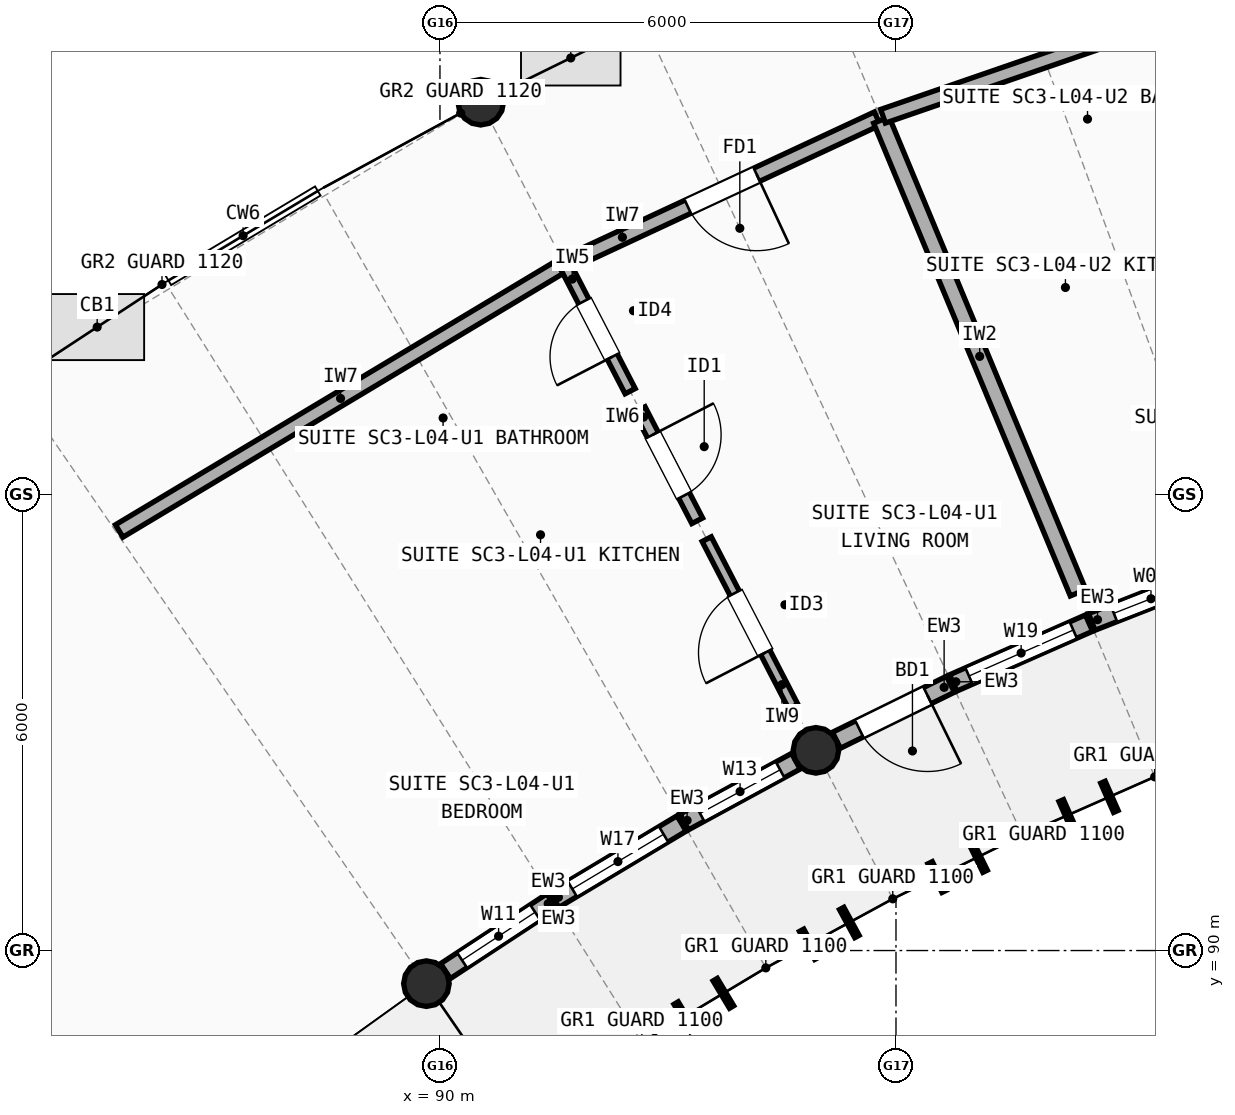
"""IFC4 building model, lengths in metres.
Left out: names, types, materials, properties, quantities, classifications, styles, units other than length and angle.
Written with IfcOpenShell. Run it as: python <this file> out.ifc"""

import sys

from ifc_helpers import new_model, si_unit, direction, frame, frame_2d, origin, origin_2d, place, context, subcontext, project, spatial, rectangle, circle, extrude, element, fill, save


model = new_model("IFC4")
c1 = context("Model", 3, precision=1e-05, world=origin(), true_north=direction((0.0, 1.0)))
c2 = subcontext(c1, "Body", "Model", "MODEL_VIEW")
j1 = project(units=[si_unit("LENGTHUNIT", "METRE"), si_unit("PLANEANGLEUNIT", "RADIAN")], contexts=[c1])
p1 = place(None, origin())
s1 = spatial("IfcSite", under=j1, at=p1, CompositionType="ELEMENT")
p2 = place(p1, origin())
s2 = spatial("IfcBuilding", under=s1, at=p2, CompositionType="ELEMENT")
p3 = place(p2, frame((0.0, 0.0, 14.1)))
s3 = spatial("IfcBuildingStorey", under=s2, at=p3, CompositionType="ELEMENT", Elevation=14.1)
for number, where, z_axis, x_axis in (
    (1, (89.822, 89.564, 0.0), (0.0, 0.0, 1.0), (1.0, 0.0, 0.0)),
    (2, (94.947, 92.634, 0.0), (0.0, 0.0, 1.0), (1.0, 0.0, 0.0)),
    (3, (90.536, 101.161, 0.0), (0.0, 0.0, 1.0), (1.0, 0.0, 0.0)),
):
    element("IfcColumn", number, at=place(p3, frame(where, z_axis=z_axis, x_axis=x_axis)), inside=s3, PredefinedType="COLUMN", context=c2, shape_type="SweptSolid", body=[
        extrude(circle(Radius=0.3, at=origin_2d()), origin(), (0.0, 0.0, 1.0), 2.948),
    ])
p4 = place(p3, frame((90.073, 89.729, 0.0), z_axis=(0.0, 0.0, 1.0), x_axis=(0.83589302699, 0.548892382375, 0.0)))
e4 = element("IfcWall", 4, at=p4, inside=s3, PredefinedType="STANDARD", context=c2, shape_type="SweptSolid", body=[
    extrude(rectangle(XDim=1.672, YDim=0.235, at=frame_2d((0.836, 0.0))), origin(), (0.0, 0.0, 1.0), 2.684),
])
p5 = place(p4, frame((0.261, 0.0, 0.85)))
e5 = element("IfcOpeningElement", 5, at=p5, cuts=e4, PredefinedType="OPENING", context=c2, shape_type="SweptSolid", body=[
    extrude(rectangle(XDim=1.15, YDim=1.45, at=frame_2d((0.575, 0.725))), frame((0.0, 0.127, 0.0), z_axis=(0.0, -1.0, 0.0), x_axis=(1.0, 0.0, 0.0)), (0.0, 0.0, 1.0), 0.255),
])
p6 = place(p3, frame((91.504, 90.668, 0.0), z_axis=(0.0, 0.0, 1.0), x_axis=(0.85787888411, 0.51385194385, 0.0)))
e6 = element("IfcWall", 6, at=p6, inside=s3, PredefinedType="STANDARD", context=c2, shape_type="SweptSolid", body=[
    extrude(rectangle(XDim=1.952, YDim=0.235, at=frame_2d((0.976, 0.0))), origin(), (0.0, 0.0, 1.0), 2.684),
])
p7 = place(p6, frame((0.276, 0.0, 0.85)))
e7 = element("IfcOpeningElement", 7, at=p7, cuts=e6, PredefinedType="OPENING", context=c2, shape_type="SweptSolid", body=[
    extrude(rectangle(XDim=1.4, YDim=1.5, at=frame_2d((0.7, 0.75))), frame((0.0, 0.127, 0.0), z_axis=(0.0, -1.0, 0.0), x_axis=(1.0, 0.0, 0.0)), (0.0, 0.0, 1.0), 0.255),
])
p8 = place(p3, frame((93.214, 91.692, 0.0), z_axis=(0.0, 0.0, 1.0), x_axis=(0.878508628322, 0.477726480284, 0.0)))
e8 = element("IfcWall", 8, at=p8, inside=s3, PredefinedType="STANDARD", context=c2, shape_type="SweptSolid", body=[
    extrude(rectangle(XDim=1.672, YDim=0.235, at=frame_2d((0.836, 0.0))), origin(), (0.0, 0.0, 1.0), 2.684),
])
p9 = place(p8, frame((0.236, 0.0, 0.85)))
e9 = element("IfcOpeningElement", 9, at=p9, cuts=e8, PredefinedType="OPENING", context=c2, shape_type="SweptSolid", body=[
    extrude(rectangle(XDim=1.2, YDim=1.45, at=frame_2d((0.6, 0.725))), frame((0.0, 0.127, 0.0), z_axis=(0.0, -1.0, 0.0), x_axis=(1.0, 0.0, 0.0)), (0.0, 0.0, 1.0), 0.255),
])
p10 = place(p3, frame((95.216, 92.766, 0.0), z_axis=(0.0, 0.0, 1.0), x_axis=(0.897558380725, 0.440895626186, 0.0)))
e10 = element("IfcWall", 10, at=p10, inside=s3, PredefinedType="STANDARD", context=c2, shape_type="SweptSolid", body=[
    extrude(rectangle(XDim=1.672, YDim=0.235, at=frame_2d((0.836, 0.0))), origin(), (0.0, 0.0, 1.0), 2.684),
])
p11 = place(p10, frame((0.336, 0.0, 0.0)))
e11 = element("IfcOpeningElement", 11, at=p11, cuts=e10, PredefinedType="OPENING", context=c2, shape_type="SweptSolid", body=[
    extrude(rectangle(XDim=1.0, YDim=2.15, at=frame_2d((0.5, 1.075))), frame((0.0, 0.127, 0.0), z_axis=(0.0, -1.0, 0.0), x_axis=(1.0, 0.0, 0.0)), (0.0, 0.0, 1.0), 0.255),
])
p12 = place(p3, frame((96.753, 93.521, 0.0), z_axis=(0.0, 0.0, 1.0), x_axis=(0.915126852478, 0.403166025197, 0.0)))
e12 = element("IfcWall", 12, at=p12, inside=s3, PredefinedType="STANDARD", context=c2, shape_type="SweptSolid", body=[
    extrude(rectangle(XDim=1.952, YDim=0.235, at=frame_2d((0.976, 0.0))), origin(), (0.0, 0.0, 1.0), 2.684),
])
p13 = place(p12, frame((0.226, 0.0, 0.85)))
e13 = element("IfcOpeningElement", 13, at=p13, cuts=e12, PredefinedType="OPENING", context=c2, shape_type="SweptSolid", body=[
    extrude(rectangle(XDim=1.5, YDim=1.5, at=frame_2d((0.75, 0.75))), frame((0.0, 0.127, 0.0), z_axis=(0.0, -1.0, 0.0), x_axis=(1.0, 0.0, 0.0)), (0.0, 0.0, 1.0), 0.255),
])
p14 = place(p3, frame((98.577, 94.323, 0.0), z_axis=(0.0, 0.0, 1.0), x_axis=(0.930962495902, 0.365114819233, 0.0)))
e14 = element("IfcWall", 14, at=p14, inside=s3, PredefinedType="STANDARD", context=c2, shape_type="SweptSolid", body=[
    extrude(rectangle(XDim=1.672, YDim=0.235, at=frame_2d((0.836, 0.0))), origin(), (0.0, 0.0, 1.0), 2.684),
])
p15 = place(p14, frame((0.311, 0.0, 0.85)))
e15 = element("IfcOpeningElement", 15, at=p15, cuts=e14, PredefinedType="OPENING", context=c2, shape_type="SweptSolid", body=[
    extrude(rectangle(XDim=1.05, YDim=1.35, at=frame_2d((0.525, 0.675))), frame((0.0, 0.127, 0.0), z_axis=(0.0, -1.0, 0.0), x_axis=(1.0, 0.0, 0.0)), (0.0, 0.0, 1.0), 0.255),
])
p16 = place(p3, frame((85.779, 95.52, 0.0), z_axis=(0.0, 0.0, 1.0), x_axis=(0.857911441451, 0.513797585268, 0.0)))
e16 = element("IfcWall", 16, at=p16, inside=s3, PredefinedType="SOLIDWALL", context=c2, shape_type="SweptSolid", body=[
    extrude(rectangle(XDim=6.79, YDim=0.19, at=frame_2d((3.395, 0.0))), origin(), (0.0, 0.0, 1.0), 2.742),
])
p17 = place(p3, frame((91.675, 99.046, 0.0), z_axis=(0.0, 0.0, 1.0), x_axis=(0.906512639591, 0.422178675755, 0.0)))
e17 = element("IfcWall", 17, at=p17, inside=s3, PredefinedType="SOLIDWALL", context=c2, shape_type="SweptSolid", body=[
    extrude(rectangle(XDim=4.501, YDim=0.19, at=frame_2d((2.251, 0.0))), origin(), (0.0, 0.0, 1.0), 2.742),
])
p18 = place(p17, frame((1.751, 0.0, 0.0)))
e18 = element("IfcOpeningElement", 18, at=p18, cuts=e17, PredefinedType="OPENING", context=c2, shape_type="SweptSolid", body=[
    extrude(rectangle(XDim=1.0, YDim=2.15, at=frame_2d((0.5, 1.075))), frame((0.0, 0.105, 0.0), z_axis=(0.0, -1.0, 0.0), x_axis=(1.0, 0.0, 0.0)), (0.0, 0.0, 1.0), 0.21),
])
p19 = place(p3, frame((94.649, 93.209, 0.0), z_axis=(0.0, 0.0, 1.0), x_axis=(-0.459457735566, 0.888199633657, 0.0)))
e19 = element("IfcWall", 19, at=p19, inside=s3, PredefinedType="PARTITIONING", context=c2, shape_type="SweptSolid", body=[
    extrude(rectangle(XDim=2.48, YDim=0.135, at=frame_2d((1.24, 0.0))), origin(), (0.0, 0.0, 1.0), 2.722),
])
p20 = place(p19, frame((0.8, 0.0, 0.0)))
e20 = element("IfcOpeningElement", 20, at=p20, cuts=e19, PredefinedType="OPENING", context=c2, shape_type="SweptSolid", body=[
    extrude(rectangle(XDim=0.88, YDim=2.1, at=frame_2d((0.44, 1.05))), frame((0.0, 0.077, 0.0), z_axis=(0.0, -1.0, 0.0), x_axis=(1.0, 0.0, 0.0)), (0.0, 0.0, 1.0), 0.155),
])
p21 = place(p3, frame((93.385, 95.654, 0.0), z_axis=(0.0, 0.0, 1.0), x_axis=(-0.459495453195, 0.888180121649, 0.0)))
e21 = element("IfcWall", 21, at=p21, inside=s3, PredefinedType="PLUMBINGWALL", context=c2, shape_type="SweptSolid", body=[
    extrude(rectangle(XDim=1.648, YDim=0.16, at=frame_2d((0.824, 0.0))), origin(), (0.0, 0.0, 1.0), 2.722),
])
p22 = place(p21, frame((0.374, 0.0, 0.0)))
e22 = element("IfcOpeningElement", 22, at=p22, cuts=e21, PredefinedType="OPENING", context=c2, shape_type="SweptSolid", body=[
    extrude(rectangle(XDim=0.9, YDim=2.1, at=frame_2d((0.45, 1.05))), frame((0.0, 0.09, 0.0), z_axis=(0.0, -1.0, 0.0), x_axis=(1.0, 0.0, 0.0)), (0.0, 0.0, 1.0), 0.18),
])
p23 = place(p3, frame((92.502, 97.359, 0.0), z_axis=(0.0, 0.0, 1.0), x_axis=(-0.459379600499, 0.888240047873, 0.0)))
e23 = element("IfcWall", 23, at=p23, inside=s3, PredefinedType="PARTITIONING", context=c2, shape_type="SweptSolid", body=[
    extrude(rectangle(XDim=1.84, YDim=0.15, at=frame_2d((0.92, 0.0))), origin(), (0.0, 0.0, 1.0), 2.722),
])
p24 = place(p23, frame((0.51, 0.0, 0.0)))
e24 = element("IfcOpeningElement", 24, at=p24, cuts=e23, PredefinedType="OPENING", context=c2, shape_type="SweptSolid", body=[
    extrude(rectangle(XDim=0.82, YDim=2.08, at=frame_2d((0.41, 1.04))), frame((0.0, 0.085, 0.0), z_axis=(0.0, -1.0, 0.0), x_axis=(1.0, 0.0, 0.0)), (0.0, 0.0, 1.0), 0.17),
])
p25 = place(p3, frame((98.395, 94.707, 0.0), z_axis=(0.0, 0.0, 1.0), x_axis=(-0.384190705314, 0.923253758157, 0.0)))
e25 = element("IfcWall", 25, at=p25, inside=s3, PredefinedType="SOLIDWALL", context=c2, shape_type="SweptSolid", body=[
    extrude(rectangle(XDim=6.736, YDim=0.22, at=frame_2d((3.368, 0.0))), origin(), (0.0, 0.0, 1.0), 2.762),
])
p26 = place(p3, frame((95.83, 100.976, 0.0), z_axis=(0.0, 0.0, 1.0), x_axis=(0.945371453115, 0.325995115969, 0.0)))
e26 = element("IfcWall", 26, at=p26, inside=s3, PredefinedType="SOLIDWALL", context=c2, shape_type="SweptSolid", body=[
    extrude(rectangle(XDim=6.79, YDim=0.19, at=frame_2d((3.395, 0.0))), origin(), (0.0, 0.0, 1.0), 2.722),
])
p27 = place(p5, origin())
e27 = element("IfcWindow", 27, at=p27, inside=s3, PartitioningType="SINGLE_PANEL", PredefinedType="WINDOW", context=c2, shape_type="SweptSolid", body=[
    extrude(rectangle(XDim=1.15, YDim=1.45, at=frame_2d((0.575, 0.725))), frame((0.0, 0.03, 0.0), z_axis=(0.0, -1.0, 0.0), x_axis=(1.0, 0.0, 0.0)), (0.0, 0.0, 1.0), 0.06),
])
fill(e5, e27)
p28 = place(p7, origin())
e28 = element("IfcWindow", 28, at=p28, inside=s3, PartitioningType="SINGLE_PANEL", PredefinedType="WINDOW", context=c2, shape_type="SweptSolid", body=[
    extrude(rectangle(XDim=1.4, YDim=1.5, at=frame_2d((0.7, 0.75))), frame((0.0, 0.03, 0.0), z_axis=(0.0, -1.0, 0.0), x_axis=(1.0, 0.0, 0.0)), (0.0, 0.0, 1.0), 0.06),
])
fill(e7, e28)
p29 = place(p9, origin())
e29 = element("IfcWindow", 29, at=p29, inside=s3, PartitioningType="SINGLE_PANEL", PredefinedType="WINDOW", context=c2, shape_type="SweptSolid", body=[
    extrude(rectangle(XDim=1.2, YDim=1.45, at=frame_2d((0.6, 0.725))), frame((0.0, 0.03, 0.0), z_axis=(0.0, -1.0, 0.0), x_axis=(1.0, 0.0, 0.0)), (0.0, 0.0, 1.0), 0.06),
])
fill(e9, e29)
p30 = place(p11, frame((1.0, 0.0, 0.0), z_axis=(0.0, 0.0, 1.0), x_axis=(-1.0, 0.0, 0.0)))
e30 = element("IfcDoor", 30, at=p30, inside=s3, OperationType="SINGLE_SWING_RIGHT", PredefinedType="DOOR", context=c2, shape_type="SweptSolid", body=[
    extrude(rectangle(XDim=1.0, YDim=2.15, at=frame_2d((0.5, 1.075))), frame((0.0, 0.025, 0.0), z_axis=(0.0, -1.0, 0.0), x_axis=(1.0, 0.0, 0.0)), (0.0, 0.0, 1.0), 0.05),
])
fill(e11, e30)
p31 = place(p13, origin())
e31 = element("IfcWindow", 31, at=p31, inside=s3, PartitioningType="SINGLE_PANEL", PredefinedType="WINDOW", context=c2, shape_type="SweptSolid", body=[
    extrude(rectangle(XDim=1.5, YDim=1.5, at=frame_2d((0.75, 0.75))), frame((0.0, 0.03, 0.0), z_axis=(0.0, -1.0, 0.0), x_axis=(1.0, 0.0, 0.0)), (0.0, 0.0, 1.0), 0.06),
])
fill(e13, e31)
p32 = place(p15, origin())
e32 = element("IfcWindow", 32, at=p32, inside=s3, PartitioningType="SINGLE_PANEL", PredefinedType="WINDOW", context=c2, shape_type="SweptSolid", body=[
    extrude(rectangle(XDim=1.05, YDim=1.35, at=frame_2d((0.525, 0.675))), frame((0.0, 0.03, 0.0), z_axis=(0.0, -1.0, 0.0), x_axis=(1.0, 0.0, 0.0)), (0.0, 0.0, 1.0), 0.06),
])
fill(e15, e32)
p33 = place(p18, origin())
e33 = element("IfcDoor", 33, at=p33, inside=s3, OperationType="SINGLE_SWING_RIGHT", PredefinedType="DOOR", context=c2, shape_type="SweptSolid", body=[
    extrude(rectangle(XDim=1.0, YDim=2.15, at=frame_2d((0.5, 1.075))), frame((0.0, 0.025, 0.0), z_axis=(0.0, -1.0, 0.0), x_axis=(1.0, 0.0, 0.0)), (0.0, 0.0, 1.0), 0.05),
])
fill(e18, e33)
p34 = place(p20, origin())
e34 = element("IfcDoor", 34, at=p34, inside=s3, OperationType="SINGLE_SWING_LEFT", PredefinedType="DOOR", context=c2, shape_type="SweptSolid", body=[
    extrude(rectangle(XDim=0.88, YDim=2.1, at=frame_2d((0.44, 1.05))), frame((0.0, 0.025, 0.0), z_axis=(0.0, -1.0, 0.0), x_axis=(1.0, 0.0, 0.0)), (0.0, 0.0, 1.0), 0.05),
])
fill(e20, e34)
p35 = place(p22, origin())
e35 = element("IfcDoor", 35, at=p35, inside=s3, OperationType="SINGLE_SWING_RIGHT", PredefinedType="DOOR", context=c2, shape_type="SweptSolid", body=[
    extrude(rectangle(XDim=0.9, YDim=2.1, at=frame_2d((0.45, 1.05))), frame((0.0, 0.025, 0.0), z_axis=(0.0, -1.0, 0.0), x_axis=(1.0, 0.0, 0.0)), (0.0, 0.0, 1.0), 0.05),
])
fill(e22, e35)
p36 = place(p24, origin())
e36 = element("IfcDoor", 36, at=p36, inside=s3, OperationType="SINGLE_SWING_LEFT", PredefinedType="DOOR", context=c2, shape_type="SweptSolid", body=[
    extrude(rectangle(XDim=0.82, YDim=2.08, at=frame_2d((0.41, 1.04))), frame((0.0, 0.025, 0.0), z_axis=(0.0, -1.0, 0.0), x_axis=(1.0, 0.0, 0.0)), (0.0, 0.0, 1.0), 0.05),
])
fill(e24, e36)
save(model, sys.argv[1])
